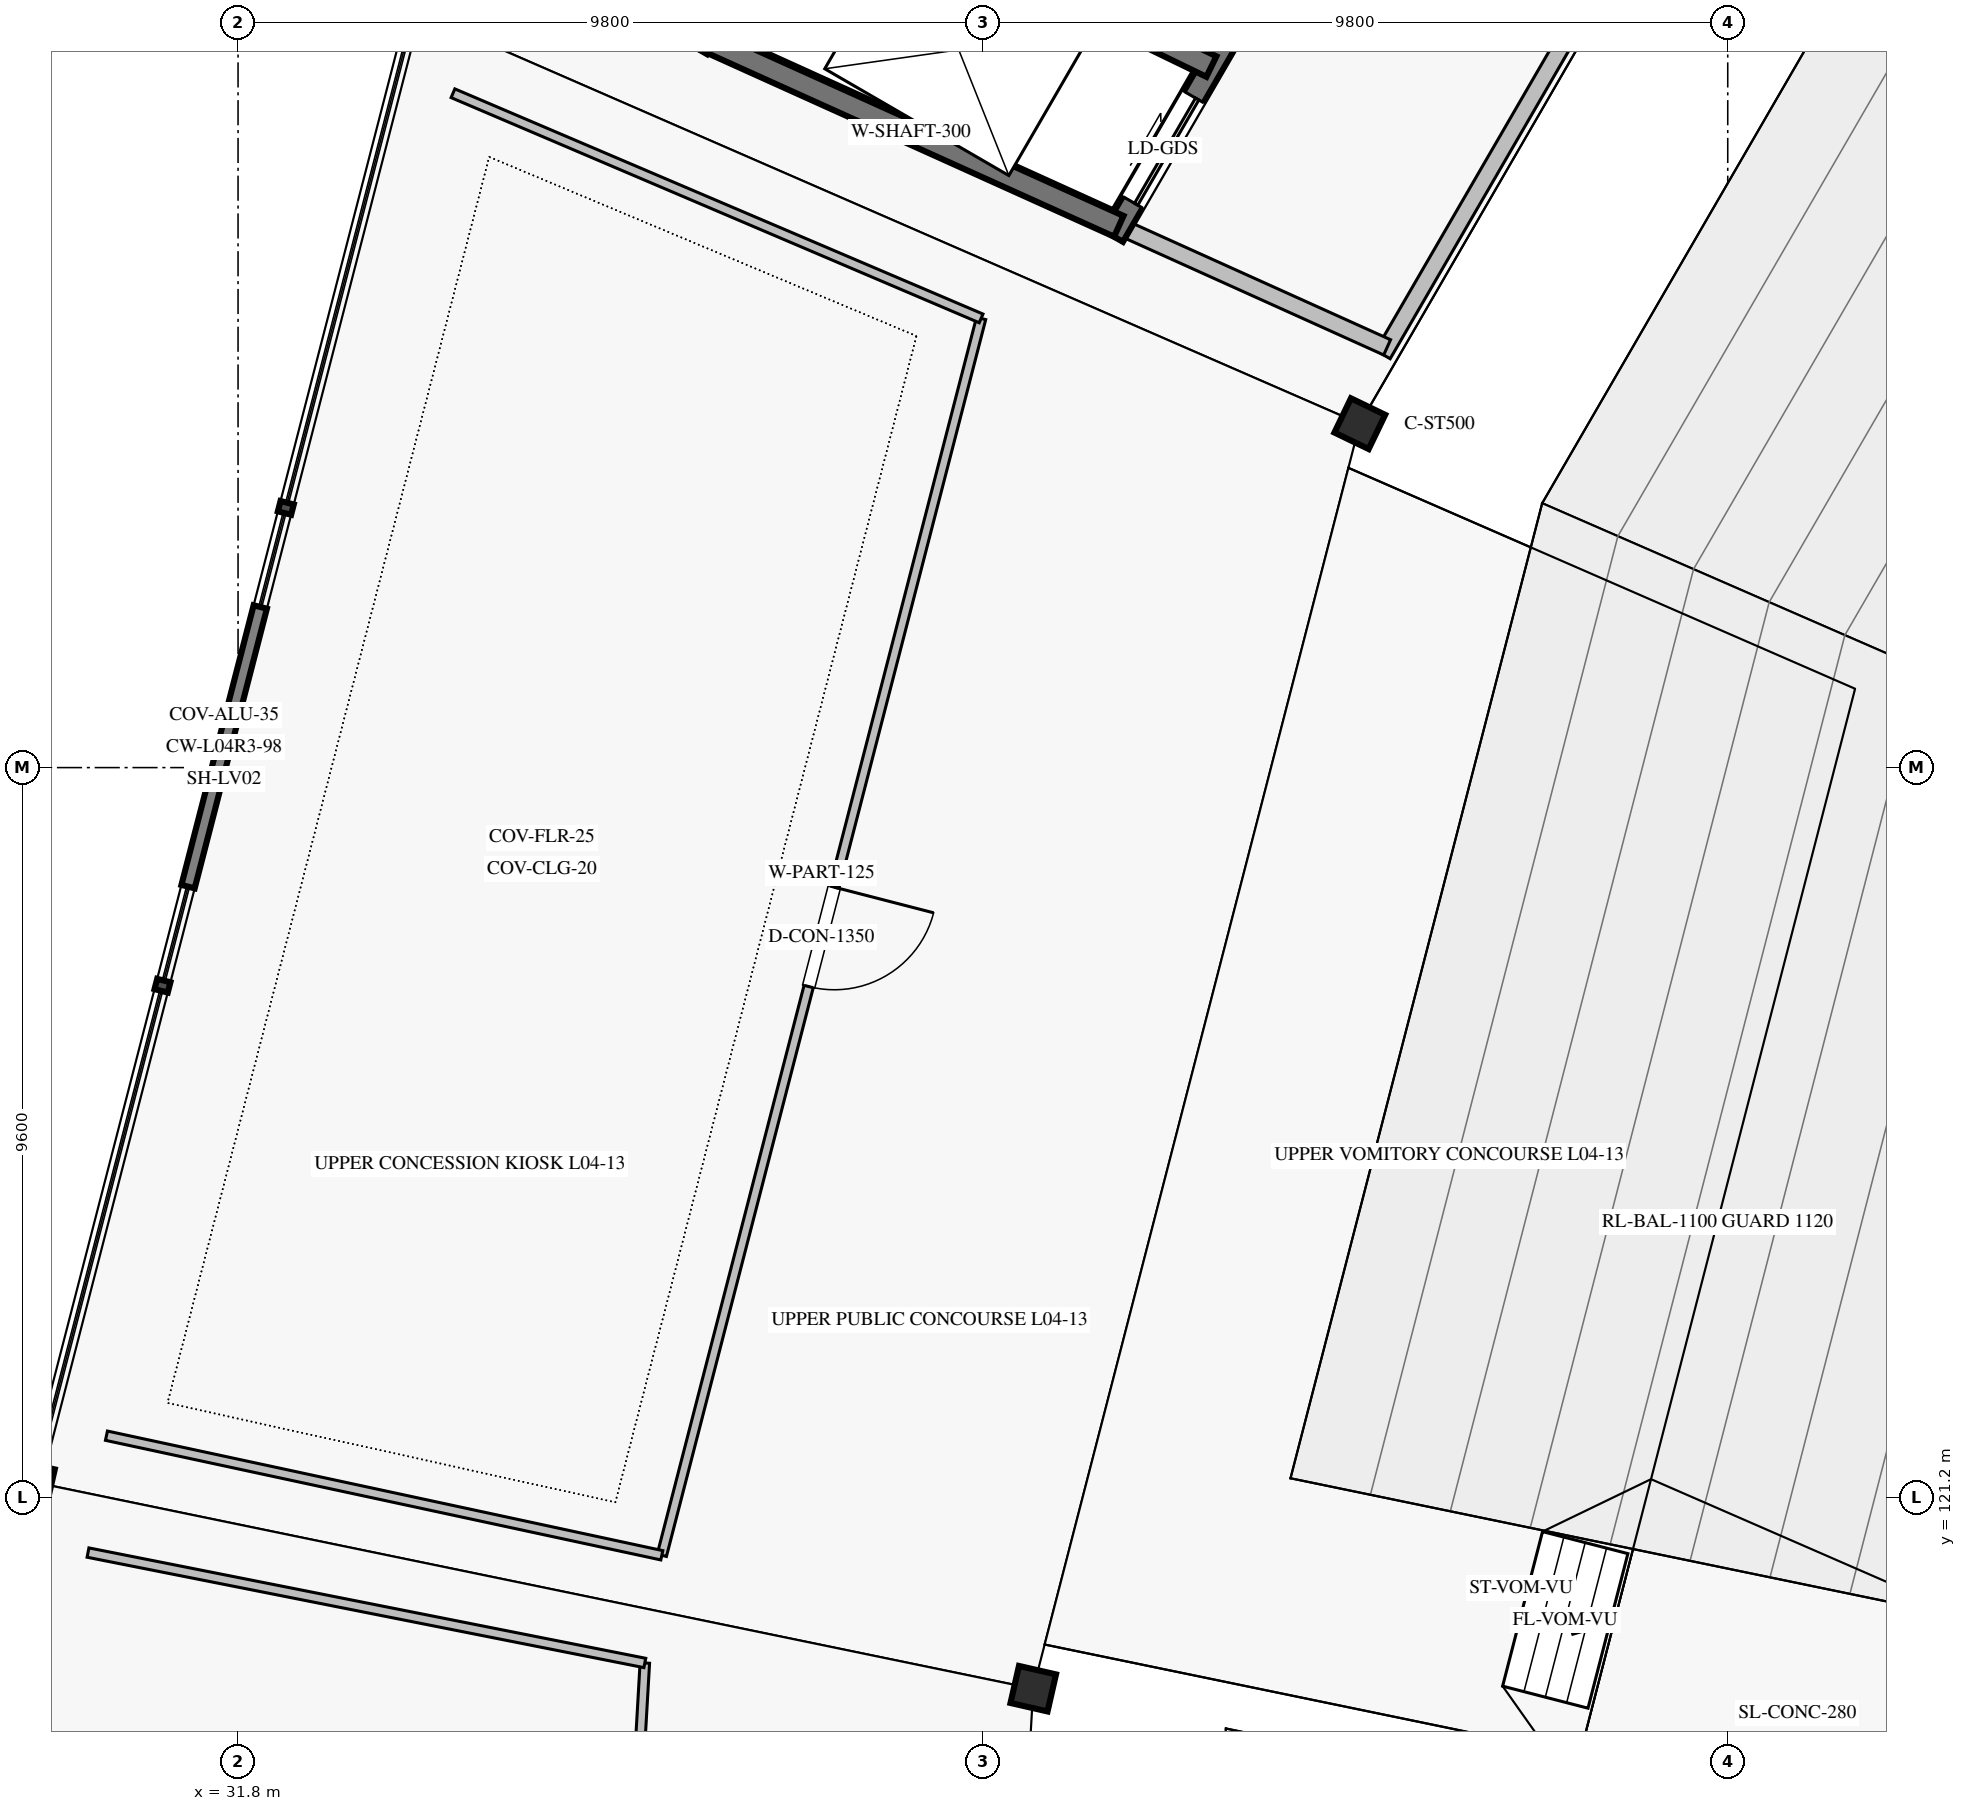
"""IFC4 building model, lengths in metres.
Left out: names, types, materials, properties, quantities, classifications, styles, units other than length and angle.
Written with IfcOpenShell. Run it as: python <this file> out.ifc"""

import sys

from ifc_helpers import new_model, si_unit, direction, frame, frame_2d, origin, origin_2d, place, context, subcontext, project, spatial, rectangle, hollow_rectangle, extrude, element, fill, save


model = new_model("IFC4")
c1 = context("Model", 3, precision=1e-05, world=origin(), true_north=direction((0.0, 1.0)))
c2 = subcontext(c1, "Body", "Model", "MODEL_VIEW")
j1 = project(units=[si_unit("LENGTHUNIT", "METRE"), si_unit("PLANEANGLEUNIT", "RADIAN")], contexts=[c1])
p1 = place(None, origin())
s1 = spatial("IfcSite", under=j1, at=p1, CompositionType="ELEMENT")
p2 = place(p1, origin())
s2 = spatial("IfcBuilding", under=s1, at=p2, CompositionType="ELEMENT")
p3 = place(p2, frame((0.0, 0.0, 20.4)))
s3 = spatial("IfcBuildingStorey", under=s2, at=p3, CompositionType="ELEMENT", Elevation=20.4)
for number, where, z_axis, x_axis in (
    (1, (46.559, 135.325, 0.0), (0.0, 0.0, 1.0), (-0.901, 0.434, 0.0)),
    (2, (42.262, 118.682, 0.0), (0.0, 0.0, 1.0), (-0.975, 0.223, 0.0)),
):
    element("IfcColumn", number, at=place(p3, frame(where, z_axis=z_axis, x_axis=x_axis)), inside=s3, PredefinedType="COLUMN", context=c2, shape_type="SweptSolid", body=[
        extrude(hollow_rectangle(XDim=0.5, YDim=0.5, WallThickness=0.022, at=origin_2d()), origin(), (0.0, 0.0, 1.0), 5.44),
    ])
p4 = place(p3, frame((29.119, 121.398, 0.0), z_axis=(0.0, 0.0, 1.0), x_axis=(-0.974927912182, 0.222520933954, 0.0)))
e3 = element("IfcColumn", 3, at=p4, inside=s3, PredefinedType="COLUMN", context=c2, shape_type="SweptSolid", body=[
    extrude(hollow_rectangle(XDim=0.45, YDim=0.45, WallThickness=0.022, at=origin_2d()), origin(), (0.0, 0.0, 1.0), 5.44),
])
p5 = place(p3, frame((45.9, 142.254, 0.0), z_axis=(0.0, 0.0, 1.0), x_axis=(-0.501629534056, -0.86508254552, 0.0)))
e4 = element("IfcWall", 4, at=p5, inside=s3, PredefinedType="SHEAR", context=c2, shape_type="SweptSolid", body=[
    extrude(rectangle(XDim=5.157, YDim=0.3, at=frame_2d((2.579, 0.0))), origin(), (0.0, 0.0, 1.0), 5.18),
])
p6 = place(p5, frame((0.766, 0.0, 0.0)))
e5 = element("IfcOpeningElement", 5, at=p6, cuts=e4, PredefinedType="OPENING", context=c2, shape_type="SweptSolid", body=[
    extrude(rectangle(XDim=1.1, YDim=2.2, at=frame_2d((0.55, 1.1))), frame((0.0, 0.16, 0.0), z_axis=(0.0, -1.0, 0.0), x_axis=(1.0, 0.0, 0.0)), (0.0, 0.0, 1.0), 0.32),
])
p7 = place(p5, frame((3.042, 0.0, 0.0)))
e6 = element("IfcOpeningElement", 6, at=p7, cuts=e4, PredefinedType="OPENING", context=c2, shape_type="SweptSolid", body=[
    extrude(rectangle(XDim=1.6, YDim=2.3, at=frame_2d((0.8, 1.15))), frame((0.0, 0.16, 0.0), z_axis=(0.0, -1.0, 0.0), x_axis=(1.0, 0.0, 0.0)), (0.0, 0.0, 1.0), 0.32),
])
p8 = place(p3, frame((40.595, 145.012, 0.0), z_axis=(0.0, 0.0, 1.0), x_axis=(-0.501630260479, -0.865082124293, 0.0)))
e7 = element("IfcWall", 7, at=p8, inside=s3, PredefinedType="SHEAR", context=c2, shape_type="SweptSolid", body=[
    extrude(rectangle(XDim=5.491, YDim=0.3, at=frame_2d((2.746, 0.0))), origin(), (0.0, 0.0, 1.0), 5.18),
])
p9 = place(p3, frame((43.388, 137.922, 0.0), z_axis=(0.0, 0.0, 1.0), x_axis=(-0.911521602376, 0.41125219562, 0.0)))
e8 = element("IfcWall", 8, at=p9, inside=s3, PredefinedType="SHEAR", context=c2, shape_type="SweptSolid", body=[
    extrude(rectangle(XDim=6.004, YDim=0.3, at=frame_2d((3.002, 0.0))), origin(), (0.0, 0.0, 1.0), 5.18),
])
p10 = place(p3, frame((44.606, 140.023, 0.0), z_axis=(0.0, 0.0, 1.0), x_axis=(-0.899759302591, 0.436386522936, 0.0)))
e9 = element("IfcWall", 9, at=p10, inside=s3, PredefinedType="SHEAR", context=c2, shape_type="SweptSolid", body=[
    extrude(rectangle(XDim=5.989, YDim=0.3, at=frame_2d((2.995, 0.0))), origin(), (0.0, 0.0, 1.0), 5.18),
])
p11 = place(p3, frame((54.944, 150.17, 0.0), z_axis=(0.0, 0.0, 1.0), x_axis=(-0.501612626242, -0.865092349518, 0.0)))
e10 = element("IfcWall", 10, at=p11, inside=s3, PredefinedType="SOLIDWALL", context=c2, shape_type="SweptSolid", body=[
    extrude(rectangle(XDim=16.11, YDim=0.22, at=frame_2d((8.055, 0.0))), origin(), (0.0, 0.0, 1.0), 5.18),
])
p12 = place(p3, frame((46.918, 136.329, 0.0), z_axis=(0.0, 0.0, 1.0), x_axis=(-0.91149641055, 0.411308027582, 0.0)))
e11 = element("IfcWall", 11, at=p12, inside=s3, PredefinedType="SOLIDWALL", context=c2, shape_type="SweptSolid", body=[
    extrude(rectangle(XDim=3.873, YDim=0.22, at=frame_2d((1.937, 0.0))), origin(), (0.0, 0.0, 1.0), 5.18),
])
p13 = place(p3, frame((41.576, 136.709, 0.0), z_axis=(0.0, 0.0, 1.0), x_axis=(-0.249966328054, -0.968254529986, 0.0)))
e12 = element("IfcWall", 12, at=p13, inside=s3, PredefinedType="PARTITIONING", context=c2, shape_type="SweptSolid", body=[
    extrude(rectangle(XDim=16.806, YDim=0.125, at=frame_2d((8.403, 0.0))), origin(), (0.0, 0.0, 1.0), 4.5),
])
p14 = place(p13, frame((7.728, 0.0, 0.0)))
e13 = element("IfcOpeningElement", 13, at=p14, cuts=e12, PredefinedType="OPENING", context=c2, shape_type="SweptSolid", body=[
    extrude(rectangle(XDim=1.35, YDim=2.15, at=frame_2d((0.675, 1.075))), frame((0.0, 0.073, 0.0), z_axis=(0.0, -1.0, 0.0), x_axis=(1.0, 0.0, 0.0)), (0.0, 0.0, 1.0), 0.145),
])
p15 = place(p3, frame((41.576, 136.709, 0.0), z_axis=(0.0, 0.0, 1.0), x_axis=(-0.919898990597, 0.39215538642, 0.0)))
e14 = element("IfcWall", 14, at=p15, inside=s3, PredefinedType="PARTITIONING", context=c2, shape_type="SweptSolid", body=[
    extrude(rectangle(XDim=7.553, YDim=0.125, at=frame_2d((3.777, 0.0))), origin(), (0.0, 0.0, 1.0), 4.5),
])
p16 = place(p3, frame((37.375, 120.437, 0.0), z_axis=(0.0, 0.0, 1.0), x_axis=(-0.977591606225, 0.210510454464, 0.0)))
e15 = element("IfcWall", 15, at=p16, inside=s3, PredefinedType="PARTITIONING", context=c2, shape_type="SweptSolid", body=[
    extrude(rectangle(XDim=7.475, YDim=0.125, at=frame_2d((3.737, 0.0))), origin(), (0.0, 0.0, 1.0), 4.5),
])
p17 = place(p3, frame((37.152, 119.02, 0.0), z_axis=(0.0, 0.0, 1.0), x_axis=(-0.057605127437, -0.998339445927, 0.0)))
e16 = element("IfcWall", 16, at=p17, inside=s3, PredefinedType="PARTITIONING", context=c2, shape_type="SweptSolid", body=[
    extrude(rectangle(XDim=16.338, YDim=0.125, at=frame_2d((8.169, 0.0))), origin(), (0.0, 0.0, 1.0), 4.5),
])
p18 = place(p17, frame((7.559, 0.0, 0.0)))
e17 = element("IfcOpeningElement", 17, at=p18, cuts=e16, PredefinedType="OPENING", context=c2, shape_type="SweptSolid", body=[
    extrude(rectangle(XDim=1.22, YDim=2.15, at=frame_2d((0.61, 1.075))), frame((0.0, 0.073, 0.0), z_axis=(0.0, -1.0, 0.0), x_axis=(1.0, 0.0, 0.0)), (0.0, 0.0, 1.0), 0.145),
])
p19 = place(p3, frame((37.152, 119.02, 0.0), z_axis=(0.0, 0.0, 1.0), x_axis=(-0.980903700741, 0.194494035571, 0.0)))
e18 = element("IfcWall", 18, at=p19, inside=s3, PredefinedType="PARTITIONING", context=c2, shape_type="SweptSolid", body=[
    extrude(rectangle(XDim=7.469, YDim=0.125, at=frame_2d((3.734, 0.0))), origin(), (0.0, 0.0, 1.0), 4.5),
])
p20 = place(p7, origin())
e19 = element("IfcDoor", 19, at=p20, inside=s3, OperationType="SLIDING_TO_LEFT", PredefinedType="DOOR", context=c2, shape_type="SweptSolid", body=[
    extrude(rectangle(XDim=1.6, YDim=2.3, at=frame_2d((0.8, 1.15))), frame((0.0, 0.025, 0.0), z_axis=(0.0, -1.0, 0.0), x_axis=(1.0, 0.0, 0.0)), (0.0, 0.0, 1.0), 0.05),
])
fill(e6, e19)
p21 = place(p14, origin())
e20 = element("IfcDoor", 20, at=p21, inside=s3, OperationType="SINGLE_SWING_LEFT", PredefinedType="DOOR", context=c2, shape_type="SweptSolid", body=[
    extrude(rectangle(XDim=1.35, YDim=2.15, at=frame_2d((0.675, 1.075))), frame((0.0, 0.025, 0.0), z_axis=(0.0, -1.0, 0.0), x_axis=(1.0, 0.0, 0.0)), (0.0, 0.0, 1.0), 0.05),
])
fill(e13, e20)
save(model, sys.argv[1])
